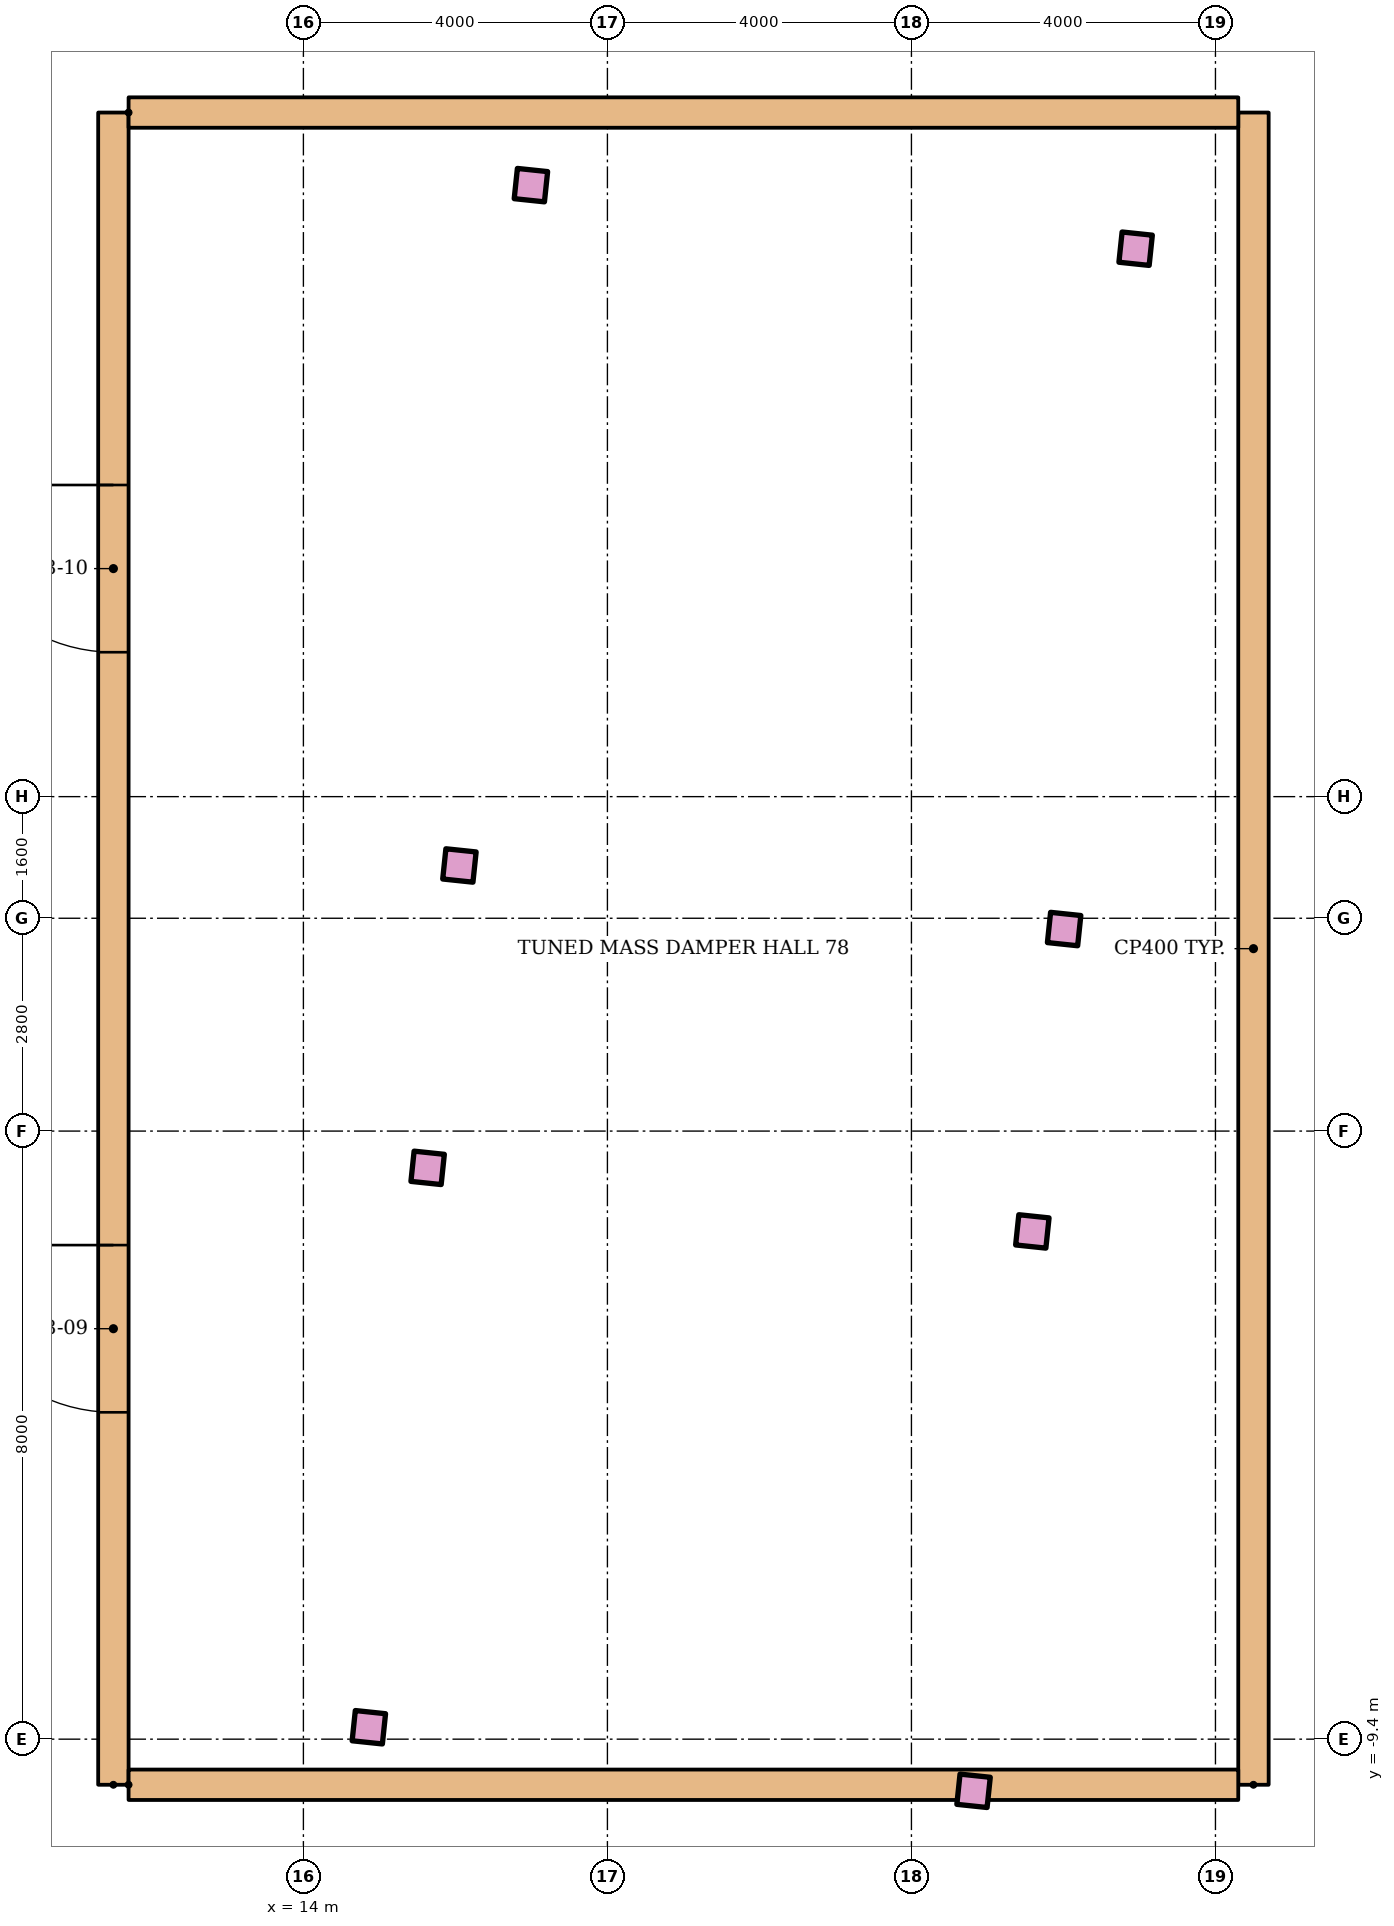
"""IFC4 building model, lengths in metres.
Left out: names, types, materials, properties, quantities, classifications, styles, units other than length and angle.
Written with IfcOpenShell. Run it as: python <this file> out.ifc"""

import sys

from ifc_helpers import new_model, si_unit, direction, frame, frame_2d, origin, origin_2d, place, context, subcontext, project, spatial, rectangle, extrude, element, fill, save


model = new_model("IFC4")
c1 = context("Model", 3, precision=1e-05, world=origin(), true_north=direction((0.0, 1.0)))
c2 = subcontext(c1, "Body", "Model", "MODEL_VIEW")
j1 = project(units=[si_unit("LENGTHUNIT", "METRE"), si_unit("PLANEANGLEUNIT", "RADIAN")], contexts=[c1])
p1 = place(None, origin())
s1 = spatial("IfcSite", under=j1, at=p1, CompositionType="ELEMENT")
p2 = place(p1, origin())
s2 = spatial("IfcBuilding", under=s1, at=p2, CompositionType="ELEMENT")
p3 = place(p2, frame((0.0, 0.0, 301.7)))
s3 = spatial("IfcBuildingStorey", under=s2, at=p3, CompositionType="ELEMENT", Elevation=301.7)
for number, where, z_axis, x_axis in (
    (1, (14.861, -9.243, 0.0), (0.0, 0.0, 1.0), (0.995, -0.105, 0.0)),
    (2, (22.817, -10.08, 0.0), (0.0, 0.0, 1.0), (0.995, -0.105, 0.0)),
    (3, (15.635, -1.884, 0.0), (0.0, 0.0, 1.0), (0.995, -0.105, 0.0)),
    (4, (23.591, -2.72, 0.0), (0.0, 0.0, 1.0), (0.995, -0.105, 0.0)),
    (5, (16.053, 2.094, 0.0), (0.0, 0.0, 1.0), (0.995, -0.105, 0.0)),
    (6, (24.009, 1.258, 0.0), (0.0, 0.0, 1.0), (0.995, -0.105, 0.0)),
    (7, (16.993, 11.045, 0.0), (0.0, 0.0, 1.0), (0.995, -0.105, 0.0)),
    (8, (24.95, 10.209, 0.0), (0.0, 0.0, 1.0), (0.995, -0.105, 0.0)),
):
    element("IfcColumn", number, at=place(p3, frame(where, z_axis=z_axis, x_axis=x_axis)), inside=s3, PredefinedType="COLUMN", context=c2, shape_type="SweptSolid", body=[
        extrude(rectangle(XDim=0.4, YDim=0.4, at=origin_2d()), origin(), (0.0, 0.0, 1.0), 7.5),
    ])
p4 = place(p3, frame((11.5, -10.0, 0.0), z_axis=(0.0, 0.0, 1.0), x_axis=(0.0, 1.0, 0.0)))
e9 = element("IfcWall", 9, at=p4, inside=s3, PredefinedType="PARTITIONING", context=c2, shape_type="SweptSolid", body=[
    extrude(rectangle(XDim=22.0, YDim=0.4, at=frame_2d((11.0, 0.0))), origin(), (0.0, 0.0, 1.0), 7.08),
])
p5 = place(p4, frame((4.9, 0.0, 0.0)))
e10 = element("IfcOpeningElement", 10, at=p5, cuts=e9, PredefinedType="OPENING", context=c2, shape_type="SweptSolid", body=[
    extrude(rectangle(XDim=2.2, YDim=2.4, at=frame_2d((1.1, 1.2))), frame((0.0, 0.21, 0.0), z_axis=(0.0, -1.0, 0.0), x_axis=(1.0, 0.0, 0.0)), (0.0, 0.0, 1.0), 0.42),
])
p6 = place(p4, frame((14.9, 0.0, 0.0)))
e11 = element("IfcOpeningElement", 11, at=p6, cuts=e9, PredefinedType="OPENING", context=c2, shape_type="SweptSolid", body=[
    extrude(rectangle(XDim=2.2, YDim=2.4, at=frame_2d((1.1, 1.2))), frame((0.0, 0.21, 0.0), z_axis=(0.0, -1.0, 0.0), x_axis=(1.0, 0.0, 0.0)), (0.0, 0.0, 1.0), 0.42),
])
p7 = place(p3, frame((26.5, -10.0, 0.0), z_axis=(0.0, 0.0, 1.0), x_axis=(0.0, 1.0, 0.0)))
e12 = element("IfcWall", 12, at=p7, inside=s3, PredefinedType="PARTITIONING", context=c2, shape_type="SweptSolid", body=[
    extrude(rectangle(XDim=22.0, YDim=0.4, at=frame_2d((11.0, 0.0))), origin(), (0.0, 0.0, 1.0), 7.08),
])
for number, where in (
    (13, (11.7, -10.0, 0.0)),
    (14, (11.7, 12.0, 0.0)),
):
    element("IfcWall", number, at=place(p3, frame(where)), inside=s3, PredefinedType="PARTITIONING", context=c2, shape_type="SweptSolid", body=[
        extrude(rectangle(XDim=14.6, YDim=0.4, at=frame_2d((7.3, 0.0))), origin(), (0.0, 0.0, 1.0), 7.08),
    ])
p8 = place(p5, origin())
e15 = element("IfcDoor", 15, at=p8, inside=s3, OperationType="DOUBLE_DOOR_SINGLE_SWING", PredefinedType="DOOR", context=c2, shape_type="SweptSolid", body=[
    extrude(rectangle(XDim=2.2, YDim=2.4, at=frame_2d((1.1, 1.2))), frame((0.0, 0.025, 0.0), z_axis=(0.0, -1.0, 0.0), x_axis=(1.0, 0.0, 0.0)), (0.0, 0.0, 1.0), 0.05),
])
fill(e10, e15)
p9 = place(p6, origin())
e16 = element("IfcDoor", 16, at=p9, inside=s3, OperationType="DOUBLE_DOOR_SINGLE_SWING", PredefinedType="DOOR", context=c2, shape_type="SweptSolid", body=[
    extrude(rectangle(XDim=2.2, YDim=2.4, at=frame_2d((1.1, 1.2))), frame((0.0, 0.025, 0.0), z_axis=(0.0, -1.0, 0.0), x_axis=(1.0, 0.0, 0.0)), (0.0, 0.0, 1.0), 0.05),
])
fill(e11, e16)
save(model, sys.argv[1])
